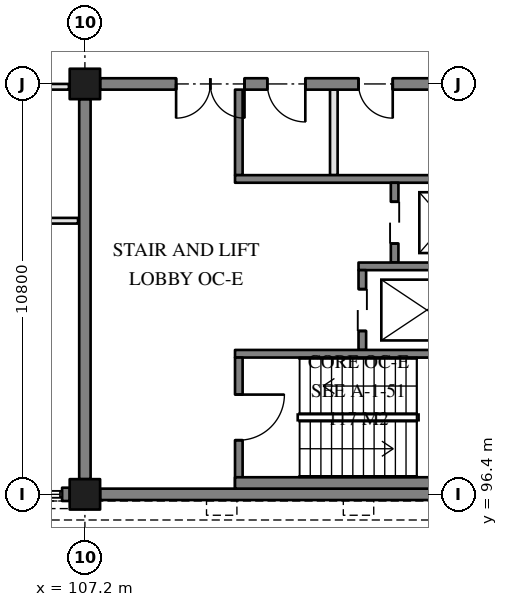
"""IFC4 building model, lengths in metres.
Left out: names, types, materials, properties, quantities, classifications, styles, units other than length and angle.
Written with IfcOpenShell. Run it as: python <this file> out.ifc"""

import sys

from ifc_helpers import new_model, si_unit, direction, frame, frame_2d, origin, origin_2d, place, context, subcontext, project, spatial, rectangle, extrude, element, fill, save


model = new_model("IFC4")
c1 = context("Model", 3, precision=1e-05, world=origin(), true_north=direction((0.0, 1.0)))
c2 = subcontext(c1, "Body", "Model", "MODEL_VIEW")
j1 = project(units=[si_unit("LENGTHUNIT", "METRE"), si_unit("PLANEANGLEUNIT", "RADIAN")], contexts=[c1])
p1 = place(None, origin())
s1 = spatial("IfcSite", under=j1, at=p1, CompositionType="ELEMENT")
p2 = place(p1, origin())
s2 = spatial("IfcBuilding", under=s1, at=p2, CompositionType="ELEMENT")
p3 = place(p2, frame((0.0, 0.0, 4.8)))
s3 = spatial("IfcBuildingStorey", under=s2, at=p3, CompositionType="ELEMENT", Elevation=4.8)
p4 = place(p3, frame((107.2, 96.4, 0.0), z_axis=(0.0, 0.0, 1.0), x_axis=(1.0, 0.0, 0.0)))
e1 = element("IfcColumn", 1, at=p4, inside=s3, PredefinedType="COLUMN", context=c2, shape_type="SweptSolid", body=[
    extrude(rectangle(XDim=0.8, YDim=0.8, at=origin_2d()), origin(), (0.0, 0.0, 1.0), 3.9),
])
p5 = place(p3, frame((107.2, 107.2, -1.3), z_axis=(0.0, 0.0, 1.0), x_axis=(1.0, 0.0, 0.0)))
e2 = element("IfcColumn", 2, at=p5, inside=s3, PredefinedType="COLUMN", context=c2, shape_type="SweptSolid", body=[
    extrude(rectangle(XDim=0.8, YDim=0.8, at=origin_2d()), origin(), (0.0, 0.0, 1.0), 5.2),
])
p6 = place(p3, frame((107.6, 96.4, 0.0), z_axis=(0.0, 0.0, 1.0), x_axis=(1.0, 0.0, 0.0)))
e3 = element("IfcWall", 3, at=p6, inside=s3, PredefinedType="SOLIDWALL", context=c2, shape_type="SweptSolid", body=[
    extrude(rectangle(XDim=10.0, YDim=0.3, at=frame_2d((5.0, 0.0))), origin(), (0.0, 0.0, 1.0), 3.9),
])
p7 = place(p3, frame((117.6, 107.2, 0.0), z_axis=(0.0, 0.0, 1.0), x_axis=(-1.0, 0.0, 0.0)))
e4 = element("IfcWall", 4, at=p7, inside=s3, PredefinedType="SOLIDWALL", context=c2, shape_type="SweptSolid", body=[
    extrude(rectangle(XDim=10.0, YDim=0.3, at=frame_2d((5.0, 0.0))), origin(), (0.0, 0.0, 1.0), 3.9),
])
p8 = place(p7, frame((6.2, 0.0, 0.0)))
e5 = element("IfcOpeningElement", 5, at=p8, cuts=e4, PredefinedType="OPENING", context=c2, shape_type="SweptSolid", body=[
    extrude(rectangle(XDim=1.8, YDim=2.1, at=frame_2d((0.9, 1.05))), frame((0.0, 0.16, 0.0), z_axis=(0.0, -1.0, 0.0), x_axis=(1.0, 0.0, 0.0)), (0.0, 0.0, 1.0), 0.32),
])
p9 = place(p7, frame((4.6, 0.0, 0.0)))
e6 = element("IfcOpeningElement", 6, at=p9, cuts=e4, PredefinedType="OPENING", context=c2, shape_type="SweptSolid", body=[
    extrude(rectangle(XDim=1.0, YDim=2.1, at=frame_2d((0.5, 1.05))), frame((0.0, 0.16, 0.0), z_axis=(0.0, -1.0, 0.0), x_axis=(1.0, 0.0, 0.0)), (0.0, 0.0, 1.0), 0.32),
])
p10 = place(p7, frame((2.3, 0.0, 0.0)))
e7 = element("IfcOpeningElement", 7, at=p10, cuts=e4, PredefinedType="OPENING", context=c2, shape_type="SweptSolid", body=[
    extrude(rectangle(XDim=0.9, YDim=2.1, at=frame_2d((0.45, 1.05))), frame((0.0, 0.16, 0.0), z_axis=(0.0, -1.0, 0.0), x_axis=(1.0, 0.0, 0.0)), (0.0, 0.0, 1.0), 0.32),
])
p11 = place(p3, frame((107.2, 106.8, 0.0), z_axis=(0.0, 0.0, 1.0), x_axis=(0.0, -1.0, 0.0)))
e8 = element("IfcWall", 8, at=p11, inside=s3, PredefinedType="SOLIDWALL", context=c2, shape_type="SweptSolid", body=[
    extrude(rectangle(XDim=10.0, YDim=0.3, at=frame_2d((5.0, 0.0))), origin(), (0.0, 0.0, 1.0), 3.9),
])
p12 = place(p3, frame((106.6, 96.4, 0.0), z_axis=(0.0, 0.0, 1.0), x_axis=(1.0, 0.0, 0.0)))
e9 = element("IfcWall", 9, at=p12, inside=s3, PredefinedType="SOLIDWALL", context=c2, shape_type="SweptSolid", body=[
    extrude(rectangle(XDim=0.2, YDim=0.35, at=frame_2d((0.1, 0.0))), origin(), (0.0, 0.0, 1.0), 3.6),
])
p13 = place(p3, frame((111.25, 107.05, 0.0), z_axis=(0.0, 0.0, 1.0), x_axis=(0.0, -1.0, 0.0)))
e10 = element("IfcWall", 10, at=p13, inside=s3, PredefinedType="SOLIDWALL", context=c2, shape_type="SweptSolid", body=[
    extrude(rectangle(XDim=2.25, YDim=0.2, at=frame_2d((1.125, 0.0))), origin(), (0.0, 0.0, 1.0), 3.6),
])
p14 = place(p3, frame((111.15, 104.7, 0.0), z_axis=(0.0, 0.0, 1.0), x_axis=(1.0, 0.0, 0.0)))
e11 = element("IfcWall", 11, at=p14, inside=s3, PredefinedType="SOLIDWALL", context=c2, shape_type="SweptSolid", body=[
    extrude(rectangle(XDim=6.7, YDim=0.2, at=frame_2d((3.35, 0.0))), origin(), (0.0, 0.0, 1.0), 3.6),
])
p15 = place(p3, frame((115.35, 104.6, 0.0), z_axis=(0.0, 0.0, 1.0), x_axis=(0.0, -1.0, 0.0)))
e12 = element("IfcWall", 12, at=p15, inside=s3, PredefinedType="SOLIDWALL", context=c2, shape_type="SweptSolid", body=[
    extrude(rectangle(XDim=2.1, YDim=0.2, at=frame_2d((1.05, 0.0))), origin(), (0.0, 0.0, 1.0), 3.6),
])
p16 = place(p15, frame((0.5, 0.0, 0.0)))
e13 = element("IfcOpeningElement", 13, at=p16, cuts=e12, PredefinedType="OPENING", context=c2, shape_type="SweptSolid", body=[
    extrude(rectangle(XDim=1.1, YDim=2.1, at=frame_2d((0.55, 1.05))), frame((0.0, 0.11, 0.0), z_axis=(0.0, -1.0, 0.0), x_axis=(1.0, 0.0, 0.0)), (0.0, 0.0, 1.0), 0.22),
])
p17 = place(p3, frame((114.4, 102.4, 0.0), z_axis=(0.0, 0.0, 1.0), x_axis=(1.0, 0.0, 0.0)))
e14 = element("IfcWall", 14, at=p17, inside=s3, PredefinedType="SOLIDWALL", context=c2, shape_type="SweptSolid", body=[
    extrude(rectangle(XDim=3.45, YDim=0.2, at=frame_2d((1.725, 0.0))), origin(), (0.0, 0.0, 1.0), 3.6),
])
p18 = place(p3, frame((114.5, 102.3, 0.0), z_axis=(0.0, 0.0, 1.0), x_axis=(0.0, -1.0, 0.0)))
e15 = element("IfcWall", 15, at=p18, inside=s3, PredefinedType="SOLIDWALL", context=c2, shape_type="SweptSolid", body=[
    extrude(rectangle(XDim=2.1, YDim=0.2, at=frame_2d((1.05, 0.0))), origin(), (0.0, 0.0, 1.0), 3.6),
])
p19 = place(p18, frame((0.5, 0.0, 0.0)))
e16 = element("IfcOpeningElement", 16, at=p19, cuts=e15, PredefinedType="OPENING", context=c2, shape_type="SweptSolid", body=[
    extrude(rectangle(XDim=1.1, YDim=2.1, at=frame_2d((0.55, 1.05))), frame((0.0, 0.11, 0.0), z_axis=(0.0, -1.0, 0.0), x_axis=(1.0, 0.0, 0.0)), (0.0, 0.0, 1.0), 0.22),
])
p20 = place(p3, frame((111.15, 100.1, 0.0), z_axis=(0.0, 0.0, 1.0), x_axis=(1.0, 0.0, 0.0)))
e17 = element("IfcWall", 17, at=p20, inside=s3, PredefinedType="SOLIDWALL", context=c2, shape_type="SweptSolid", body=[
    extrude(rectangle(XDim=6.7, YDim=0.2, at=frame_2d((3.35, 0.0))), origin(), (0.0, 0.0, 1.0), 3.6),
])
p21 = place(p3, frame((111.25, 100.0, 0.0), z_axis=(0.0, 0.0, 1.0), x_axis=(0.0, -1.0, 0.0)))
e18 = element("IfcWall", 18, at=p21, inside=s3, PredefinedType="SOLIDWALL", context=c2, shape_type="SweptSolid", body=[
    extrude(rectangle(XDim=3.45, YDim=0.2, at=frame_2d((1.725, 0.0))), origin(), (0.0, 0.0, 1.0), 3.6),
])
p22 = place(p21, frame((0.975, 0.0, 0.0)))
e19 = element("IfcOpeningElement", 19, at=p22, cuts=e18, PredefinedType="OPENING", context=c2, shape_type="SweptSolid", body=[
    extrude(rectangle(XDim=1.2, YDim=2.1, at=frame_2d((0.6, 1.05))), frame((0.0, 0.11, 0.0), z_axis=(0.0, -1.0, 0.0), x_axis=(1.0, 0.0, 0.0)), (0.0, 0.0, 1.0), 0.22),
])
p23 = place(p3, frame((111.15, 96.7, 0.0), z_axis=(0.0, 0.0, 1.0), x_axis=(1.0, 0.0, 0.0)))
e20 = element("IfcWall", 20, at=p23, inside=s3, PredefinedType="SOLIDWALL", context=c2, shape_type="SweptSolid", body=[
    extrude(rectangle(XDim=6.7, YDim=0.3, at=frame_2d((3.35, 0.0))), origin(), (0.0, 0.0, 1.0), 3.6),
])
p24 = place(p3, frame((113.75, 107.05, 0.0), z_axis=(0.0, 0.0, 1.0), x_axis=(0.0, -1.0, 0.0)))
e21 = element("IfcWall", 21, at=p24, inside=s3, PredefinedType="PARTITIONING", context=c2, shape_type="SweptSolid", body=[
    extrude(rectangle(XDim=2.25, YDim=0.2, at=frame_2d((1.125, 0.0))), origin(), (0.0, 0.0, 1.0), 3.6),
])
p25 = place(p3, frame((96.4, 103.6, 0.0), z_axis=(0.0, 0.0, 1.0), x_axis=(1.0, 0.0, 0.0)))
e22 = element("IfcWall", 22, at=p25, inside=s3, PredefinedType="PARTITIONING", context=c2, shape_type="SweptSolid", body=[
    extrude(rectangle(XDim=10.62, YDim=0.15, at=frame_2d((5.31, 0.0))), origin(), (0.0, 0.0, 1.0), 2.8),
])
p26 = place(p3, frame((96.82, 107.125, 0.0), z_axis=(0.0, 0.0, 1.0), x_axis=(1.0, 0.0, 0.0)))
e23 = element("IfcWall", 23, at=p26, inside=s3, PredefinedType="PARTITIONING", context=c2, shape_type="SweptSolid", body=[
    extrude(rectangle(XDim=9.96, YDim=0.15, at=frame_2d((4.98, 0.0))), origin(), (0.0, 0.0, 1.0), 2.8),
])
p27 = place(p26, frame((4.48, 0.0, 0.0)))
e24 = element("IfcOpeningElement", 24, at=p27, cuts=e23, PredefinedType="OPENING", context=c2, shape_type="SweptSolid", body=[
    extrude(rectangle(XDim=1.0, YDim=2.1, at=frame_2d((0.5, 1.05))), frame((0.0, 0.085, 0.0), z_axis=(0.0, -1.0, 0.0), x_axis=(1.0, 0.0, 0.0)), (0.0, 0.0, 1.0), 0.17),
])
p28 = place(p16, frame((1.1, 0.0, 0.0), z_axis=(0.0, 0.0, 1.0), x_axis=(-1.0, 0.0, 0.0)))
e25 = element("IfcDoor", 25, at=p28, inside=s3, OperationType="DOUBLE_DOOR_SLIDING", PredefinedType="DOOR", context=c2, shape_type="SweptSolid", body=[
    extrude(rectangle(XDim=1.1, YDim=2.1, at=frame_2d((0.55, 1.05))), frame((0.0, 0.025, 0.0), z_axis=(0.0, -1.0, 0.0), x_axis=(1.0, 0.0, 0.0)), (0.0, 0.0, 1.0), 0.05),
])
fill(e13, e25)
p29 = place(p19, frame((1.1, 0.0, 0.0), z_axis=(0.0, 0.0, 1.0), x_axis=(-1.0, 0.0, 0.0)))
e26 = element("IfcDoor", 26, at=p29, inside=s3, OperationType="DOUBLE_DOOR_SLIDING", PredefinedType="DOOR", context=c2, shape_type="SweptSolid", body=[
    extrude(rectangle(XDim=1.1, YDim=2.1, at=frame_2d((0.55, 1.05))), frame((0.0, 0.025, 0.0), z_axis=(0.0, -1.0, 0.0), x_axis=(1.0, 0.0, 0.0)), (0.0, 0.0, 1.0), 0.05),
])
fill(e16, e26)
p30 = place(p22, frame((1.2, 0.0, 0.0), z_axis=(0.0, 0.0, 1.0), x_axis=(-1.0, 0.0, 0.0)))
e27 = element("IfcDoor", 27, at=p30, inside=s3, OperationType="SINGLE_SWING_RIGHT", PredefinedType="DOOR", context=c2, shape_type="SweptSolid", body=[
    extrude(rectangle(XDim=1.2, YDim=2.1, at=frame_2d((0.6, 1.05))), frame((0.0, 0.025, 0.0), z_axis=(0.0, -1.0, 0.0), x_axis=(1.0, 0.0, 0.0)), (0.0, 0.0, 1.0), 0.05),
])
fill(e19, e27)
p31 = place(p8, frame((1.8, 0.0, 0.0), z_axis=(0.0, 0.0, 1.0), x_axis=(-1.0, 0.0, 0.0)))
e28 = element("IfcDoor", 28, at=p31, inside=s3, OperationType="DOUBLE_DOOR_DOUBLE_SWING", PredefinedType="DOOR", context=c2, shape_type="SweptSolid", body=[
    extrude(rectangle(XDim=1.8, YDim=2.1, at=frame_2d((0.9, 1.05))), frame((0.0, 0.025, 0.0), z_axis=(0.0, -1.0, 0.0), x_axis=(1.0, 0.0, 0.0)), (0.0, 0.0, 1.0), 0.05),
])
fill(e5, e28)
p32 = place(p9, origin())
e29 = element("IfcDoor", 29, at=p32, inside=s3, OperationType="SINGLE_SWING_RIGHT", PredefinedType="DOOR", context=c2, shape_type="SweptSolid", body=[
    extrude(rectangle(XDim=1.0, YDim=2.1, at=frame_2d((0.5, 1.05))), frame((0.0, 0.025, 0.0), z_axis=(0.0, -1.0, 0.0), x_axis=(1.0, 0.0, 0.0)), (0.0, 0.0, 1.0), 0.05),
])
fill(e6, e29)
p33 = place(p10, origin())
e30 = element("IfcDoor", 30, at=p33, inside=s3, OperationType="SINGLE_SWING_LEFT", PredefinedType="DOOR", context=c2, shape_type="SweptSolid", body=[
    extrude(rectangle(XDim=0.9, YDim=2.1, at=frame_2d((0.45, 1.05))), frame((0.0, 0.025, 0.0), z_axis=(0.0, -1.0, 0.0), x_axis=(1.0, 0.0, 0.0)), (0.0, 0.0, 1.0), 0.05),
])
fill(e7, e30)
save(model, sys.argv[1])
